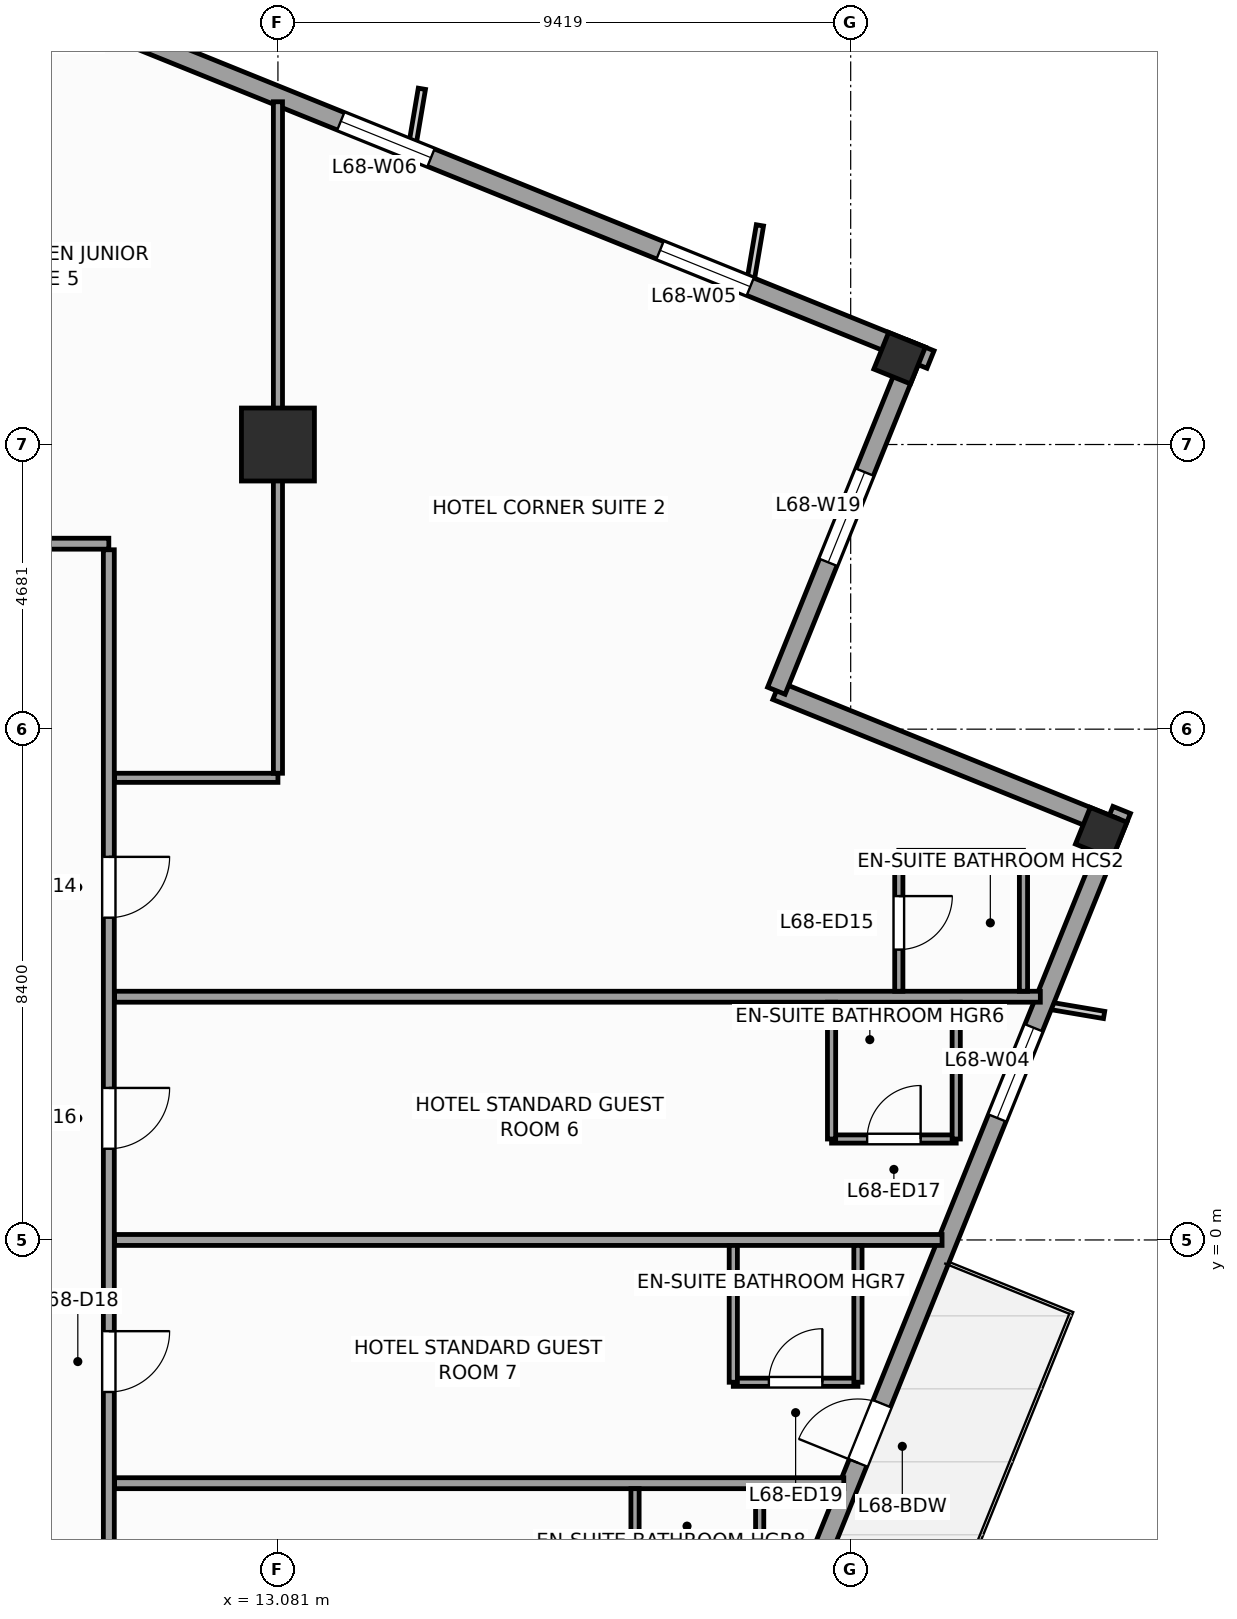
"""IFC4 building model, lengths in metres.
Left out: names, types, materials, properties, quantities, classifications, styles, units other than length and angle.
Written with IfcOpenShell. Run it as: python <this file> out.ifc"""

import sys

from ifc_helpers import new_model, si_unit, direction, frame, frame_2d, origin, origin_2d, place, context, subcontext, project, spatial, rectangle, extrude, source, transform, mapped, element, fill, save


model = new_model("IFC4")
c1 = context("Model", 3, precision=1e-05, world=origin(), true_north=direction((0.0, 1.0)))
c2 = subcontext(c1, "Body", "Model", "MODEL_VIEW")
j1 = project(units=[si_unit("LENGTHUNIT", "METRE"), si_unit("PLANEANGLEUNIT", "RADIAN")], contexts=[c1])
p1 = place(None, origin())
s1 = spatial("IfcSite", under=j1, at=p1, CompositionType="ELEMENT")
p2 = place(p1, origin())
s2 = spatial("IfcBuilding", under=s1, at=p2, CompositionType="ELEMENT")
p3 = place(p2, frame((0.0, 0.0, 279.6)))
s3 = spatial("IfcBuildingStorey", under=s2, at=p3, CompositionType="ELEMENT", Elevation=279.6)
m1 = source(origin(), c2, "Body", "SweptSolid", [
    extrude(rectangle(XDim=1.2, YDim=1.2, at=origin_2d()), origin(), (0.0, 0.0, 1.0), 3.6),
])
p4 = place(p3, frame((13.081, 13.081, 0.0), z_axis=(0.0, 0.0, 1.0), x_axis=(1.0, 0.0, 0.0)))
e1 = element("IfcColumn", 1, at=p4, inside=s3, PredefinedType="COLUMN", context=c2, shape_type="MappedRepresentation", body=[
    mapped(m1, transform((0.0, 0.0, 0.0), scale=1.0)),
])
m2 = source(origin(), c2, "Body", "SweptSolid", [
    extrude(rectangle(XDim=0.65, YDim=0.65, at=origin_2d()), origin(), (0.0, 0.0, 1.0), 3.6),
])
for number, where, z_axis, x_axis in (
    (2, (26.62, 6.69, 0.0), (0.0, 0.0, 1.0), (0.375, 0.927, 0.0)),
    (3, (23.304, 14.501, 0.0), (0.0, 0.0, 1.0), (0.375, 0.927, 0.0)),
):
    element("IfcColumn", number, at=place(p3, frame(where, z_axis=z_axis, x_axis=x_axis)), inside=s3, PredefinedType="COLUMN", context=c2, shape_type="MappedRepresentation", body=[
        mapped(m2, transform((0.0, 0.0, 0.0), scale=1.0)),
    ])
p5 = place(p3, frame((14.479, -23.813, 0.0), z_axis=(0.0, 0.0, 1.0), x_axis=(0.374609557019, 0.927182657188, 0.0)))
e4 = element("IfcWall", 4, at=p5, inside=s3, PredefinedType="STANDARD", context=c2, shape_type="SweptSolid", body=[
    extrude(rectangle(XDim=33.31, YDim=0.31, at=frame_2d((16.655, 0.0))), origin(), (0.0, 0.0, 1.0), 2.75),
])
p6 = place(p5, frame((21.73, 0.0, 0.0)))
e5 = element("IfcOpeningElement", 5, at=p6, cuts=e4, PredefinedType="OPENING", context=c2, shape_type="SweptSolid", body=[
    extrude(rectangle(XDim=1.05, YDim=2.25, at=frame_2d((0.525, 1.125))), frame((0.0, 0.165, 0.0), z_axis=(0.0, -1.0, 0.0), x_axis=(1.0, 0.0, 0.0)), (0.0, 0.0, 1.0), 0.33),
])
p7 = place(p5, frame((3.197, 0.0, 0.47)))
e6 = element("IfcOpeningElement", 6, at=p7, cuts=e4, PredefinedType="OPENING", context=c2, shape_type="SweptSolid", body=[
    extrude(rectangle(XDim=1.6, YDim=2.1, at=frame_2d((0.8, 1.05))), frame((0.0, 0.165, 0.0), z_axis=(0.0, -1.0, 0.0), x_axis=(1.0, 0.0, 0.0)), (0.0, 0.0, 1.0), 0.33),
])
p8 = place(p5, frame((8.86, 0.0, 0.47)))
e7 = element("IfcOpeningElement", 7, at=p8, cuts=e4, PredefinedType="OPENING", context=c2, shape_type="SweptSolid", body=[
    extrude(rectangle(XDim=1.6, YDim=2.1, at=frame_2d((0.8, 1.05))), frame((0.0, 0.165, 0.0), z_axis=(0.0, -1.0, 0.0), x_axis=(1.0, 0.0, 0.0)), (0.0, 0.0, 1.0), 0.33),
])
p9 = place(p5, frame((14.439, 0.0, 0.47)))
e8 = element("IfcOpeningElement", 8, at=p9, cuts=e4, PredefinedType="OPENING", context=c2, shape_type="SweptSolid", body=[
    extrude(rectangle(XDim=1.6, YDim=2.1, at=frame_2d((0.8, 1.05))), frame((0.0, 0.165, 0.0), z_axis=(0.0, -1.0, 0.0), x_axis=(1.0, 0.0, 0.0)), (0.0, 0.0, 1.0), 0.33),
])
p10 = place(p5, frame((27.847, 0.0, 0.47)))
e9 = element("IfcOpeningElement", 9, at=p10, cuts=e4, PredefinedType="OPENING", context=c2, shape_type="SweptSolid", body=[
    extrude(rectangle(XDim=1.6, YDim=2.1, at=frame_2d((0.8, 1.05))), frame((0.0, 0.165, 0.0), z_axis=(0.0, -1.0, 0.0), x_axis=(1.0, 0.0, 0.0)), (0.0, 0.0, 1.0), 0.33),
])
p11 = place(p3, frame((26.841, 6.784, 0.0), z_axis=(0.0, 0.0, 1.0), x_axis=(-0.927171722085, 0.374636620962, 0.0)))
e10 = element("IfcWall", 10, at=p11, inside=s3, PredefinedType="STANDARD", context=c2, shape_type="SweptSolid", body=[
    extrude(rectangle(XDim=6.0, YDim=0.31, at=frame_2d((3.0, 0.0))), origin(), (0.0, 0.0, 1.0), 2.65),
])
p12 = place(p3, frame((21.278, 9.032, 0.0), z_axis=(0.0, 0.0, 1.0), x_axis=(0.374602739196, 0.927185411764, 0.0)))
e11 = element("IfcWall", 11, at=p12, inside=s3, PredefinedType="STANDARD", context=c2, shape_type="SweptSolid", body=[
    extrude(rectangle(XDim=6.155, YDim=0.31, at=frame_2d((3.078, 0.0))), origin(), (0.0, 0.0, 1.0), 3.35),
])
p13 = place(p12, frame((2.278, 0.0, 0.47)))
e12 = element("IfcOpeningElement", 12, at=p13, cuts=e11, PredefinedType="OPENING", context=c2, shape_type="SweptSolid", body=[
    extrude(rectangle(XDim=1.6, YDim=2.1, at=frame_2d((0.8, 1.05))), frame((0.0, 0.165, 0.0), z_axis=(0.0, -1.0, 0.0), x_axis=(1.0, 0.0, 0.0)), (0.0, 0.0, 1.0), 0.33),
])
p14 = place(p3, frame((23.813, 14.479, 0.0), z_axis=(0.0, 0.0, 1.0), x_axis=(-0.927182657188, 0.374609557019, 0.0)))
e13 = element("IfcWall", 13, at=p14, inside=s3, PredefinedType="STANDARD", context=c2, shape_type="SweptSolid", body=[
    extrude(rectangle(XDim=33.31, YDim=0.31, at=frame_2d((16.655, 0.0))), origin(), (0.0, 0.0, 1.0), 2.75),
])
p15 = place(p14, frame((3.197, 0.0, 0.47)))
e14 = element("IfcOpeningElement", 14, at=p15, cuts=e13, PredefinedType="OPENING", context=c2, shape_type="SweptSolid", body=[
    extrude(rectangle(XDim=1.6, YDim=2.1, at=frame_2d((0.8, 1.05))), frame((0.0, 0.165, 0.0), z_axis=(0.0, -1.0, 0.0), x_axis=(1.0, 0.0, 0.0)), (0.0, 0.0, 1.0), 0.33),
])
p16 = place(p14, frame((8.86, 0.0, 0.47)))
e15 = element("IfcOpeningElement", 15, at=p16, cuts=e13, PredefinedType="OPENING", context=c2, shape_type="SweptSolid", body=[
    extrude(rectangle(XDim=1.6, YDim=2.1, at=frame_2d((0.8, 1.05))), frame((0.0, 0.165, 0.0), z_axis=(0.0, -1.0, 0.0), x_axis=(1.0, 0.0, 0.0)), (0.0, 0.0, 1.0), 0.33),
])
p17 = place(p14, frame((14.439, 0.0, 0.47)))
e16 = element("IfcOpeningElement", 16, at=p17, cuts=e13, PredefinedType="OPENING", context=c2, shape_type="SweptSolid", body=[
    extrude(rectangle(XDim=1.6, YDim=2.1, at=frame_2d((0.8, 1.05))), frame((0.0, 0.165, 0.0), z_axis=(0.0, -1.0, 0.0), x_axis=(1.0, 0.0, 0.0)), (0.0, 0.0, 1.0), 0.33),
])
p18 = place(p14, frame((21.851, 0.0, 0.47)))
e17 = element("IfcOpeningElement", 17, at=p18, cuts=e13, PredefinedType="OPENING", context=c2, shape_type="SweptSolid", body=[
    extrude(rectangle(XDim=1.6, YDim=2.1, at=frame_2d((0.8, 1.05))), frame((0.0, 0.165, 0.0), z_axis=(0.0, -1.0, 0.0), x_axis=(1.0, 0.0, 0.0)), (0.0, 0.0, 1.0), 0.33),
])
p19 = place(p14, frame((27.097, 0.0, 0.47)))
e18 = element("IfcOpeningElement", 18, at=p19, cuts=e13, PredefinedType="OPENING", context=c2, shape_type="SweptSolid", body=[
    extrude(rectangle(XDim=1.6, YDim=2.1, at=frame_2d((0.8, 1.05))), frame((0.0, 0.165, 0.0), z_axis=(0.0, -1.0, 0.0), x_axis=(1.0, 0.0, 0.0)), (0.0, 0.0, 1.0), 0.33),
])
p20 = place(p3, frame((-11.45, 11.45, 0.0), z_axis=(0.0, 0.0, 1.0), x_axis=(1.0, 0.0, 0.0)))
e19 = element("IfcWall", 19, at=p20, inside=s3, PredefinedType="PARTITIONING", context=c2, shape_type="SweptSolid", body=[
    extrude(rectangle(XDim=21.75, YDim=0.18, at=frame_2d((10.875, 0.0))), origin(), (0.0, 0.0, 1.0), 3.35),
])
p21 = place(p20, frame((2.639, 0.0, 0.0)))
e20 = element("IfcOpeningElement", 20, at=p21, cuts=e19, PredefinedType="OPENING", context=c2, shape_type="SweptSolid", body=[
    extrude(rectangle(XDim=1.0, YDim=2.15, at=frame_2d((0.5, 1.075))), frame((0.0, 0.1, 0.0), z_axis=(0.0, -1.0, 0.0), x_axis=(1.0, 0.0, 0.0)), (0.0, 0.0, 1.0), 0.2),
])
p22 = place(p20, frame((7.8, 0.0, 0.0)))
e21 = element("IfcOpeningElement", 21, at=p22, cuts=e19, PredefinedType="OPENING", context=c2, shape_type="SweptSolid", body=[
    extrude(rectangle(XDim=1.0, YDim=2.15, at=frame_2d((0.5, 1.075))), frame((0.0, 0.1, 0.0), z_axis=(0.0, -1.0, 0.0), x_axis=(1.0, 0.0, 0.0)), (0.0, 0.0, 1.0), 0.2),
])
p23 = place(p20, frame((12.65, 0.0, 0.0)))
e22 = element("IfcOpeningElement", 22, at=p23, cuts=e19, PredefinedType="OPENING", context=c2, shape_type="SweptSolid", body=[
    extrude(rectangle(XDim=1.0, YDim=2.15, at=frame_2d((0.5, 1.075))), frame((0.0, 0.1, 0.0), z_axis=(0.0, -1.0, 0.0), x_axis=(1.0, 0.0, 0.0)), (0.0, 0.0, 1.0), 0.2),
])
p24 = place(p20, frame((18.036, 0.0, 0.0)))
e23 = element("IfcOpeningElement", 23, at=p24, cuts=e19, PredefinedType="OPENING", context=c2, shape_type="SweptSolid", body=[
    extrude(rectangle(XDim=1.0, YDim=2.15, at=frame_2d((0.5, 1.075))), frame((0.0, 0.1, 0.0), z_axis=(0.0, -1.0, 0.0), x_axis=(1.0, 0.0, 0.0)), (0.0, 0.0, 1.0), 0.2),
])
p25 = place(p3, frame((10.3, -12.35, 0.0), z_axis=(0.0, 0.0, 1.0), x_axis=(0.0, 1.0, 0.0)))
e24 = element("IfcWall", 24, at=p25, inside=s3, PredefinedType="PARTITIONING", context=c2, shape_type="SweptSolid", body=[
    extrude(rectangle(XDim=23.7, YDim=0.18, at=frame_2d((11.85, 0.0))), origin(), (0.0, 0.0, 1.0), 3.35),
])
p26 = place(p25, frame((17.65, 0.0, 0.0)))
e25 = element("IfcOpeningElement", 25, at=p26, cuts=e24, PredefinedType="OPENING", context=c2, shape_type="SweptSolid", body=[
    extrude(rectangle(XDim=1.0, YDim=2.15, at=frame_2d((0.5, 1.075))), frame((0.0, 0.1, 0.0), z_axis=(0.0, -1.0, 0.0), x_axis=(1.0, 0.0, 0.0)), (0.0, 0.0, 1.0), 0.2),
])
p27 = place(p25, frame((13.85, 0.0, 0.0)))
e26 = element("IfcOpeningElement", 26, at=p27, cuts=e24, PredefinedType="OPENING", context=c2, shape_type="SweptSolid", body=[
    extrude(rectangle(XDim=1.0, YDim=2.15, at=frame_2d((0.5, 1.075))), frame((0.0, 0.1, 0.0), z_axis=(0.0, -1.0, 0.0), x_axis=(1.0, 0.0, 0.0)), (0.0, 0.0, 1.0), 0.2),
])
p28 = place(p25, frame((9.85, 0.0, 0.0)))
e27 = element("IfcOpeningElement", 27, at=p28, cuts=e24, PredefinedType="OPENING", context=c2, shape_type="SweptSolid", body=[
    extrude(rectangle(XDim=1.0, YDim=2.15, at=frame_2d((0.5, 1.075))), frame((0.0, 0.1, 0.0), z_axis=(0.0, -1.0, 0.0), x_axis=(1.0, 0.0, 0.0)), (0.0, 0.0, 1.0), 0.2),
])
p29 = place(p25, frame((6.05, 0.0, 0.0)))
e28 = element("IfcOpeningElement", 28, at=p29, cuts=e24, PredefinedType="OPENING", context=c2, shape_type="SweptSolid", body=[
    extrude(rectangle(XDim=1.0, YDim=2.15, at=frame_2d((0.5, 1.075))), frame((0.0, 0.1, 0.0), z_axis=(0.0, -1.0, 0.0), x_axis=(1.0, 0.0, 0.0)), (0.0, 0.0, 1.0), 0.2),
])
p30 = place(p3, frame((10.395, 4.0, 0.0), z_axis=(0.0, 0.0, 1.0), x_axis=(1.0, 0.0, 0.0)))
e29 = element("IfcWall", 29, at=p30, inside=s3, PredefinedType="PARTITIONING", context=c2, shape_type="SweptSolid", body=[
    extrude(rectangle(XDim=15.224, YDim=0.18, at=frame_2d((7.612, 0.0))), origin(), (0.0, 0.0, 1.0), 3.35),
])
p31 = place(p3, frame((10.395, 0.0, 0.0), z_axis=(0.0, 0.0, 1.0), x_axis=(1.0, 0.0, 0.0)))
e30 = element("IfcWall", 30, at=p31, inside=s3, PredefinedType="PARTITIONING", context=c2, shape_type="SweptSolid", body=[
    extrude(rectangle(XDim=13.608, YDim=0.18, at=frame_2d((6.804, 0.0))), origin(), (0.0, 0.0, 1.0), 3.35),
])
p32 = place(p3, frame((10.395, -4.0, 0.0), z_axis=(0.0, 0.0, 1.0), x_axis=(1.0, 0.0, 0.0)))
e31 = element("IfcWall", 31, at=p32, inside=s3, PredefinedType="PARTITIONING", context=c2, shape_type="SweptSolid", body=[
    extrude(rectangle(XDim=11.992, YDim=0.18, at=frame_2d((5.996, 0.0))), origin(), (0.0, 0.0, 1.0), 3.35),
])
p33 = place(p3, frame((10.395, 7.6, 0.0), z_axis=(0.0, 0.0, 1.0), x_axis=(1.0, 0.0, 0.0)))
e32 = element("IfcWall", 32, at=p33, inside=s3, PredefinedType="PARTITIONING", context=c2, shape_type="SweptSolid", body=[
    extrude(rectangle(XDim=2.686, YDim=0.15, at=frame_2d((1.343, 0.0))), origin(), (0.0, 0.0, 1.0), 3.35),
])
p34 = place(p3, frame((13.081, 7.675, 0.0), z_axis=(0.0, 0.0, 1.0), x_axis=(0.0, 1.0, 0.0)))
e33 = element("IfcWall", 33, at=p34, inside=s3, PredefinedType="PARTITIONING", context=c2, shape_type="SweptSolid", body=[
    extrude(rectangle(XDim=11.043, YDim=0.15, at=frame_2d((5.521, 0.0))), origin(), (0.0, 0.0, 1.0), 2.45),
])
p35 = place(p3, frame((25.342, 4.09, 0.0), z_axis=(0.0, 0.0, 1.0), x_axis=(0.0, 1.0, 0.0)))
e34 = element("IfcWall", 34, at=p35, inside=s3, PredefinedType="PARTITIONING", context=c2, shape_type="SweptSolid", body=[
    extrude(rectangle(XDim=2.25, YDim=0.135, at=frame_2d((1.125, 0.0))), origin(), (0.0, 0.0, 1.0), 2.75),
])
p36 = place(p3, frame((23.292, 6.34, 0.0), z_axis=(0.0, 0.0, 1.0), x_axis=(1.0, 0.0, 0.0)))
e35 = element("IfcWall", 35, at=p36, inside=s3, PredefinedType="PARTITIONING", context=c2, shape_type="SweptSolid", body=[
    extrude(rectangle(XDim=2.05, YDim=0.135, at=frame_2d((1.025, 0.0))), origin(), (0.0, 0.0, 1.0), 3.35),
])
p37 = place(p3, frame((23.292, 4.09, 0.0), z_axis=(0.0, 0.0, 1.0), x_axis=(0.0, 1.0, 0.0)))
e36 = element("IfcWall", 36, at=p37, inside=s3, PredefinedType="PARTITIONING", context=c2, shape_type="SweptSolid", body=[
    extrude(rectangle(XDim=2.25, YDim=0.135, at=frame_2d((1.125, 0.0))), origin(), (0.0, 0.0, 1.0), 2.95),
])
p38 = place(p37, frame((0.685, 0.0, 0.0)))
e37 = element("IfcOpeningElement", 37, at=p38, cuts=e36, PredefinedType="OPENING", context=c2, shape_type="SweptSolid", body=[
    extrude(rectangle(XDim=0.88, YDim=2.1, at=frame_2d((0.44, 1.05))), frame((0.0, 0.078, 0.0), z_axis=(0.0, -1.0, 0.0), x_axis=(1.0, 0.0, 0.0)), (0.0, 0.0, 1.0), 0.155),
])
p39 = place(p3, frame((22.186, 1.66, 0.0), z_axis=(0.0, 0.0, 1.0), x_axis=(1.0, 0.0, 0.0)))
e38 = element("IfcWall", 38, at=p39, inside=s3, PredefinedType="PARTITIONING", context=c2, shape_type="SweptSolid", body=[
    extrude(rectangle(XDim=2.05, YDim=0.135, at=frame_2d((1.025, 0.0))), origin(), (0.0, 0.0, 1.0), 3.35),
])
p40 = place(p39, frame((0.585, 0.0, 0.0)))
e39 = element("IfcOpeningElement", 39, at=p40, cuts=e38, PredefinedType="OPENING", context=c2, shape_type="SweptSolid", body=[
    extrude(rectangle(XDim=0.88, YDim=2.1, at=frame_2d((0.44, 1.05))), frame((0.0, 0.078, 0.0), z_axis=(0.0, -1.0, 0.0), x_axis=(1.0, 0.0, 0.0)), (0.0, 0.0, 1.0), 0.155),
])
for number, where, z_axis, x_axis in (
    (40, (24.236, 1.66, 0.0), (0.0, 0.0, 1.0), (0.0, 1.0, 0.0)),
    (41, (22.186, 1.66, 0.0), (0.0, 0.0, 1.0), (0.0, 1.0, 0.0)),
):
    element("IfcWall", number, at=place(p3, frame(where, z_axis=z_axis, x_axis=x_axis)), inside=s3, PredefinedType="PARTITIONING", context=c2, shape_type="SweptSolid", body=[
        extrude(rectangle(XDim=2.25, YDim=0.135, at=frame_2d((1.125, 0.0))), origin(), (0.0, 0.0, 1.0), 3.35),
    ])
p41 = place(p3, frame((20.57, -2.34, 0.0), z_axis=(0.0, 0.0, 1.0), x_axis=(1.0, 0.0, 0.0)))
e42 = element("IfcWall", 42, at=p41, inside=s3, PredefinedType="PARTITIONING", context=c2, shape_type="SweptSolid", body=[
    extrude(rectangle(XDim=2.05, YDim=0.135, at=frame_2d((1.025, 0.0))), origin(), (0.0, 0.0, 1.0), 3.35),
])
p42 = place(p41, frame((0.585, 0.0, 0.0)))
e43 = element("IfcOpeningElement", 43, at=p42, cuts=e42, PredefinedType="OPENING", context=c2, shape_type="SweptSolid", body=[
    extrude(rectangle(XDim=0.88, YDim=2.1, at=frame_2d((0.44, 1.05))), frame((0.0, 0.078, 0.0), z_axis=(0.0, -1.0, 0.0), x_axis=(1.0, 0.0, 0.0)), (0.0, 0.0, 1.0), 0.155),
])
for number, where, z_axis, x_axis in (
    (44, (22.619, -2.34, 0.0), (0.0, 0.0, 1.0), (0.0, 1.0, 0.0)),
    (45, (20.57, -2.34, 0.0), (0.0, 0.0, 1.0), (0.0, 1.0, 0.0)),
    (46, (21.003, -6.34, 0.0), (0.0, 0.0, 1.0), (0.0, 1.0, 0.0)),
    (47, (18.953, -6.34, 0.0), (0.0, 0.0, 1.0), (0.0, 1.0, 0.0)),
):
    element("IfcWall", number, at=place(p3, frame(where, z_axis=z_axis, x_axis=x_axis)), inside=s3, PredefinedType="PARTITIONING", context=c2, shape_type="SweptSolid", body=[
        extrude(rectangle(XDim=2.25, YDim=0.135, at=frame_2d((1.125, 0.0))), origin(), (0.0, 0.0, 1.0), 3.35),
    ])
m3 = source(origin(), c2, "Body", "SweptSolid", [
    extrude(rectangle(XDim=1.05, YDim=2.25, at=frame_2d((0.525, 1.125))), frame((0.0, 0.025, 0.0), z_axis=(0.0, -1.0, 0.0), x_axis=(1.0, 0.0, 0.0)), (0.0, 0.0, 1.0), 0.05),
])
p43 = place(p6, origin())
e48 = element("IfcDoor", 48, at=p43, inside=s3, OperationType="SINGLE_SWING_LEFT", PredefinedType="DOOR", context=c2, shape_type="MappedRepresentation", body=[
    mapped(m3, transform((0.0, 0.0, 0.0), scale=1.0)),
])
fill(e5, e48)
m4 = source(origin(), c2, "Body", "SweptSolid", [
    extrude(rectangle(XDim=1.6, YDim=2.1, at=frame_2d((0.8, 1.05))), frame((0.0, 0.03, 0.0), z_axis=(0.0, -1.0, 0.0), x_axis=(1.0, 0.0, 0.0)), (0.0, 0.0, 1.0), 0.06),
])
p44 = place(p10, origin())
e49 = element("IfcWindow", 49, at=p44, inside=s3, PartitioningType="SINGLE_PANEL", PredefinedType="WINDOW", context=c2, shape_type="MappedRepresentation", body=[
    mapped(m4, transform((0.0, 0.0, 0.0), scale=1.0)),
])
fill(e9, e49)
p45 = place(p15, origin())
e50 = element("IfcWindow", 50, at=p45, inside=s3, PartitioningType="SINGLE_PANEL", PredefinedType="WINDOW", context=c2, shape_type="MappedRepresentation", body=[
    mapped(m4, transform((0.0, 0.0, 0.0), scale=1.0)),
])
fill(e14, e50)
p46 = place(p16, origin())
e51 = element("IfcWindow", 51, at=p46, inside=s3, PartitioningType="SINGLE_PANEL", PredefinedType="WINDOW", context=c2, shape_type="MappedRepresentation", body=[
    mapped(m4, transform((0.0, 0.0, 0.0), scale=1.0)),
])
fill(e15, e51)
p47 = place(p13, origin())
e52 = element("IfcWindow", 52, at=p47, inside=s3, PartitioningType="SINGLE_PANEL", PredefinedType="WINDOW", context=c2, shape_type="MappedRepresentation", body=[
    mapped(m4, transform((0.0, 0.0, 0.0), scale=1.0)),
])
fill(e12, e52)
m5 = source(origin(), c2, "Body", "SweptSolid", [
    extrude(rectangle(XDim=1.0, YDim=2.15, at=frame_2d((0.5, 1.075))), frame((0.0, 0.025, 0.0), z_axis=(0.0, -1.0, 0.0), x_axis=(1.0, 0.0, 0.0)), (0.0, 0.0, 1.0), 0.05),
])
p48 = place(p26, frame((1.0, 0.0, 0.0), z_axis=(0.0, 0.0, 1.0), x_axis=(-1.0, 0.0, 0.0)))
e53 = element("IfcDoor", 53, at=p48, inside=s3, OperationType="SINGLE_SWING_RIGHT", PredefinedType="DOOR", context=c2, shape_type="MappedRepresentation", body=[
    mapped(m5, transform((0.0, 0.0, 0.0), scale=1.0)),
])
fill(e25, e53)
m6 = source(origin(), c2, "Body", "SweptSolid", [
    extrude(rectangle(XDim=0.88, YDim=2.1, at=frame_2d((0.44, 1.05))), frame((0.0, 0.025, 0.0), z_axis=(0.0, -1.0, 0.0), x_axis=(1.0, 0.0, 0.0)), (0.0, 0.0, 1.0), 0.05),
])
p49 = place(p38, frame((0.88, 0.0, 0.0), z_axis=(0.0, 0.0, 1.0), x_axis=(-1.0, 0.0, 0.0)))
e54 = element("IfcDoor", 54, at=p49, inside=s3, OperationType="SINGLE_SWING_RIGHT", PredefinedType="DOOR", context=c2, shape_type="MappedRepresentation", body=[
    mapped(m6, transform((0.0, 0.0, 0.0), scale=1.0)),
])
fill(e37, e54)
p50 = place(p27, frame((1.0, 0.0, 0.0), z_axis=(0.0, 0.0, 1.0), x_axis=(-1.0, 0.0, 0.0)))
e55 = element("IfcDoor", 55, at=p50, inside=s3, OperationType="SINGLE_SWING_RIGHT", PredefinedType="DOOR", context=c2, shape_type="MappedRepresentation", body=[
    mapped(m5, transform((0.0, 0.0, 0.0), scale=1.0)),
])
fill(e26, e55)
p51 = place(p40, origin())
e56 = element("IfcDoor", 56, at=p51, inside=s3, OperationType="SINGLE_SWING_RIGHT", PredefinedType="DOOR", context=c2, shape_type="MappedRepresentation", body=[
    mapped(m6, transform((0.0, 0.0, 0.0), scale=1.0)),
])
fill(e39, e56)
p52 = place(p28, frame((1.0, 0.0, 0.0), z_axis=(0.0, 0.0, 1.0), x_axis=(-1.0, 0.0, 0.0)))
e57 = element("IfcDoor", 57, at=p52, inside=s3, OperationType="SINGLE_SWING_RIGHT", PredefinedType="DOOR", context=c2, shape_type="MappedRepresentation", body=[
    mapped(m5, transform((0.0, 0.0, 0.0), scale=1.0)),
])
fill(e27, e57)
p53 = place(p42, origin())
e58 = element("IfcDoor", 58, at=p53, inside=s3, OperationType="SINGLE_SWING_RIGHT", PredefinedType="DOOR", context=c2, shape_type="MappedRepresentation", body=[
    mapped(m6, transform((0.0, 0.0, 0.0), scale=1.0)),
])
fill(e43, e58)
save(model, sys.argv[1])
